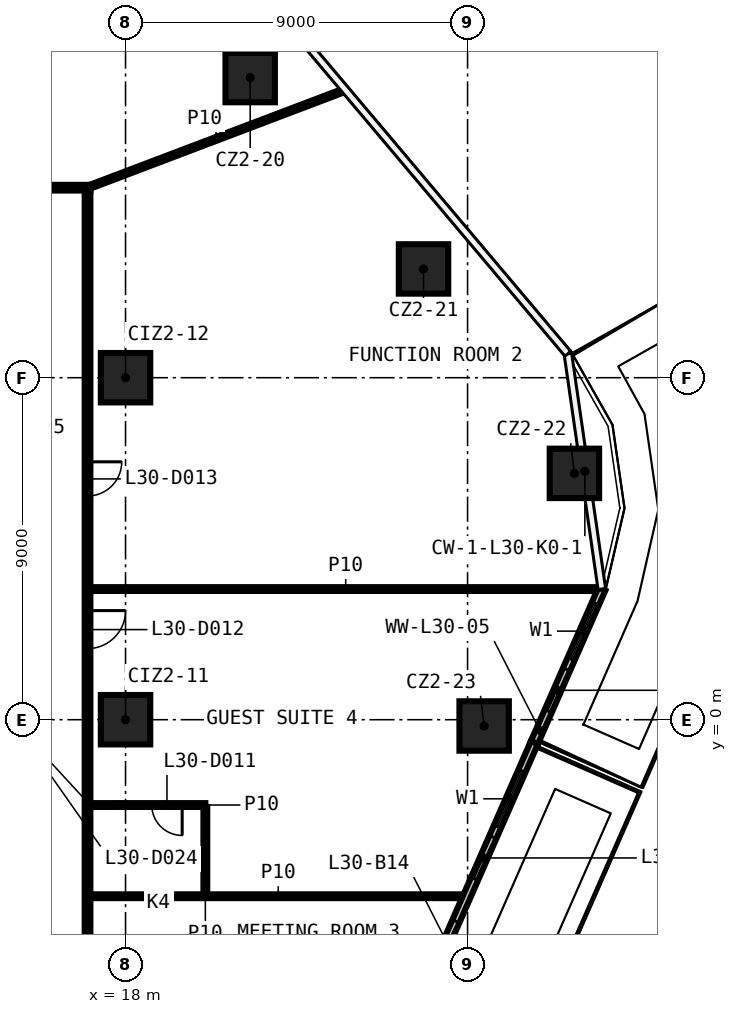
"""IFC4 building model, lengths in metres.
Left out: names, types, materials, properties, quantities, classifications, styles, units other than length and angle.
Written with IfcOpenShell. Run it as: python <this file> out.ifc"""

import sys

from ifc_helpers import new_model, si_unit, direction, frame, frame_2d, origin, origin_2d, place, context, subcontext, project, spatial, rectangle, extrude, element, fill, save


model = new_model("IFC4")
c1 = context("Model", 3, precision=1e-05, world=origin(), true_north=direction((0.0, 1.0)))
c2 = subcontext(c1, "Body", "Model", "MODEL_VIEW")
j1 = project(units=[si_unit("LENGTHUNIT", "METRE"), si_unit("PLANEANGLEUNIT", "RADIAN")], contexts=[c1])
p1 = place(None, origin())
s1 = spatial("IfcSite", under=j1, at=p1, CompositionType="ELEMENT")
p2 = place(p1, origin())
s2 = spatial("IfcBuilding", under=s1, at=p2, CompositionType="ELEMENT")
p3 = place(p2, frame((0.0, 0.0, 135.9)))
s3 = spatial("IfcBuildingStorey", under=s2, at=p3, CompositionType="ELEMENT", Elevation=135.9)
for number, where, z_axis, x_axis in (
    (1, (21.28, 16.898, 0.0), (0.0, 0.0, 1.0), (1.0, 0.0, 0.0)),
    (2, (25.841, 11.862, 0.0), (0.0, 0.0, 1.0), (1.0, 0.0, 0.0)),
    (3, (29.811, 6.482, 0.0), (0.0, 0.0, 1.0), (1.0, 0.0, 0.0)),
    (4, (27.436, -0.165, 0.0), (0.0, 0.0, 1.0), (1.0, 0.0, 0.0)),
    (5, (18.0, 0.0, 0.0), (0.0, 0.0, 1.0), (1.0, 0.0, 0.0)),
    (6, (18.0, 9.0, 0.0), (0.0, 0.0, 1.0), (1.0, 0.0, 0.0)),
):
    element("IfcColumn", number, at=place(p3, frame(where, z_axis=z_axis, x_axis=x_axis)), inside=s3, PredefinedType="COLUMN", context=c2, shape_type="SweptSolid", body=[
        extrude(rectangle(XDim=1.3, YDim=1.3, at=origin_2d()), origin(), (0.0, 0.0, 1.0), 3.3),
    ])
p4 = place(p3, frame((17.075, -4.645, 0.0), z_axis=(0.0, 0.0, 1.0), x_axis=(1.0, 0.0, 0.0)))
e7 = element("IfcWall", 7, at=p4, inside=s3, PredefinedType="PARTITIONING", context=c2, shape_type="SweptSolid", body=[
    extrude(rectangle(XDim=9.885, YDim=0.1, at=frame_2d((4.943, 0.0))), origin(), (0.0, 0.0, 1.0), 3.3),
])
p5 = place(p3, frame((20.1, -2.245, 0.0), z_axis=(0.0, 0.0, 1.0), x_axis=(-1.0, 0.0, 0.0)))
e8 = element("IfcWall", 8, at=p5, inside=s3, PredefinedType="PARTITIONING", context=c2, shape_type="SweptSolid", body=[
    extrude(rectangle(XDim=3.025, YDim=0.1, at=frame_2d((1.513, 0.0))), origin(), (0.0, 0.0, 1.0), 3.3),
])
p6 = place(p5, frame((0.61, 0.0, 0.0)))
e9 = element("IfcOpeningElement", 9, at=p6, cuts=e8, PredefinedType="OPENING", context=c2, shape_type="SweptSolid", body=[
    extrude(rectangle(XDim=0.8, YDim=2.1, at=frame_2d((0.4, 1.05))), frame((0.0, 0.06, 0.0), z_axis=(0.0, -1.0, 0.0), x_axis=(1.0, 0.0, 0.0)), (0.0, 0.0, 1.0), 0.12),
])
p7 = place(p3, frame((17.075, 3.438, 0.0), z_axis=(0.0, 0.0, 1.0), x_axis=(1.0, 0.0, 0.0)))
e10 = element("IfcWall", 10, at=p7, inside=s3, PredefinedType="PARTITIONING", context=c2, shape_type="SweptSolid", body=[
    extrude(rectangle(XDim=13.436, YDim=0.1, at=frame_2d((6.718, 0.0))), origin(), (0.0, 0.0, 1.0), 3.3),
])
p8 = place(p3, frame((-17.075, 14.0, 0.0), z_axis=(0.0, 0.0, 1.0), x_axis=(1.0, 0.0, 0.0)))
e11 = element("IfcWall", 11, at=p8, inside=s3, PredefinedType="PARTITIONING", context=c2, shape_type="SweptSolid", body=[
    extrude(rectangle(XDim=34.15, YDim=0.15, at=frame_2d((17.075, 0.0))), origin(), (0.0, 0.0, 1.0), 3.3),
])
p9 = place(p8, frame((10.954, 0.0, 0.0)))
e12 = element("IfcOpeningElement", 12, at=p9, cuts=e11, PredefinedType="OPENING", context=c2, shape_type="SweptSolid", body=[
    extrude(rectangle(XDim=0.9, YDim=2.1, at=frame_2d((0.45, 1.05))), frame((0.0, 0.085, 0.0), z_axis=(0.0, -1.0, 0.0), x_axis=(1.0, 0.0, 0.0)), (0.0, 0.0, 1.0), 0.17),
])
p10 = place(p8, frame((7.617, 0.0, 0.0)))
e13 = element("IfcOpeningElement", 13, at=p10, cuts=e11, PredefinedType="OPENING", context=c2, shape_type="SweptSolid", body=[
    extrude(rectangle(XDim=1.0, YDim=2.1, at=frame_2d((0.5, 1.05))), frame((0.0, 0.085, 0.0), z_axis=(0.0, -1.0, 0.0), x_axis=(1.0, 0.0, 0.0)), (0.0, 0.0, 1.0), 0.17),
])
p11 = place(p8, frame((2.425, 0.0, 0.0)))
e14 = element("IfcOpeningElement", 14, at=p11, cuts=e11, PredefinedType="OPENING", context=c2, shape_type="SweptSolid", body=[
    extrude(rectangle(XDim=0.9, YDim=2.1, at=frame_2d((0.45, 1.05))), frame((0.0, 0.085, 0.0), z_axis=(0.0, -1.0, 0.0), x_axis=(1.0, 0.0, 0.0)), (0.0, 0.0, 1.0), 0.17),
])
p12 = place(p3, frame((17.0, 14.0, 0.0), z_axis=(0.0, 0.0, 1.0), x_axis=(0.934953139897, 0.354771230791, 0.0)))
e15 = element("IfcWall", 15, at=p12, inside=s3, PredefinedType="PARTITIONING", context=c2, shape_type="SweptSolid", body=[
    extrude(rectangle(XDim=7.234, YDim=0.1, at=frame_2d((3.617, 0.0))), origin(), (0.0, 0.0, 1.0), 3.3),
])
p13 = place(p3, frame((20.1, -4.595, 0.0), z_axis=(0.0, 0.0, 1.0), x_axis=(0.0, 1.0, 0.0)))
e16 = element("IfcWall", 16, at=p13, inside=s3, PredefinedType="PARTITIONING", context=c2, shape_type="SweptSolid", body=[
    extrude(rectangle(XDim=2.3, YDim=0.1, at=frame_2d((1.15, 0.0))), origin(), (0.0, 0.0, 1.0), 3.3),
])
p14 = place(p3, frame((17.0, 13.925, 0.0), z_axis=(0.0, 0.0, 1.0), x_axis=(0.0, -1.0, 0.0)))
e17 = element("IfcWall", 17, at=p14, inside=s3, PredefinedType="PARTITIONING", context=c2, shape_type="SweptSolid", body=[
    extrude(rectangle(XDim=27.85, YDim=0.15, at=frame_2d((13.925, 0.0))), origin(), (0.0, 0.0, 1.0), 3.3),
])
p15 = place(p14, frame((24.983, 0.0, 0.0)))
e18 = element("IfcOpeningElement", 18, at=p15, cuts=e17, PredefinedType="OPENING", context=c2, shape_type="SweptSolid", body=[
    extrude(rectangle(XDim=0.9, YDim=2.1, at=frame_2d((0.45, 1.05))), frame((0.0, 0.085, 0.0), z_axis=(0.0, -1.0, 0.0), x_axis=(1.0, 0.0, 0.0)), (0.0, 0.0, 1.0), 0.17),
])
p16 = place(p14, frame((20.143, 0.0, 0.0)))
e19 = element("IfcOpeningElement", 19, at=p16, cuts=e17, PredefinedType="OPENING", context=c2, shape_type="SweptSolid", body=[
    extrude(rectangle(XDim=0.9, YDim=2.1, at=frame_2d((0.45, 1.05))), frame((0.0, 0.085, 0.0), z_axis=(0.0, -1.0, 0.0), x_axis=(1.0, 0.0, 0.0)), (0.0, 0.0, 1.0), 0.17),
])
p17 = place(p14, frame((11.054, 0.0, 0.0)))
e20 = element("IfcOpeningElement", 20, at=p17, cuts=e17, PredefinedType="OPENING", context=c2, shape_type="SweptSolid", body=[
    extrude(rectangle(XDim=1.0, YDim=2.1, at=frame_2d((0.5, 1.05))), frame((0.0, 0.085, 0.0), z_axis=(0.0, -1.0, 0.0), x_axis=(1.0, 0.0, 0.0)), (0.0, 0.0, 1.0), 0.17),
])
p18 = place(p14, frame((7.139, 0.0, 0.0)))
e21 = element("IfcOpeningElement", 21, at=p18, cuts=e17, PredefinedType="OPENING", context=c2, shape_type="SweptSolid", body=[
    extrude(rectangle(XDim=0.9, YDim=2.1, at=frame_2d((0.45, 1.05))), frame((0.0, 0.085, 0.0), z_axis=(0.0, -1.0, 0.0), x_axis=(1.0, 0.0, 0.0)), (0.0, 0.0, 1.0), 0.17),
])
p19 = place(p3, frame((21.65, -16.783, 0.0), z_axis=(0.0, 0.0, 1.0), x_axis=(0.402171088909, 0.915564533633, 0.0)))
e22 = element("IfcWall", 22, at=p19, inside=s3, PredefinedType="SOLIDWALL", context=c2, shape_type="SweptSolid", body=[
    extrude(rectangle(XDim=17.677, YDim=0.2, at=frame_2d((8.838, 0.0))), origin(), (0.0, 0.0, 1.0), 3.3),
])
p20 = place(p19, frame((2.0, 0.0, 0.6)))
e23 = element("IfcOpeningElement", 23, at=p20, cuts=e22, PredefinedType="OPENING", context=c2, shape_type="SweptSolid", body=[
    extrude(rectangle(XDim=1.6, YDim=2.4, at=frame_2d((0.8, 1.2))), frame((0.0, 0.11, 0.0), z_axis=(0.0, -1.0, 0.0), x_axis=(1.0, 0.0, 0.0)), (0.0, 0.0, 1.0), 0.22),
])
p21 = place(p19, frame((0.5, 0.0, 0.0)))
e24 = element("IfcOpeningElement", 24, at=p21, cuts=e22, PredefinedType="OPENING", context=c2, shape_type="SweptSolid", body=[
    extrude(rectangle(XDim=1.2, YDim=2.4, at=frame_2d((0.6, 1.2))), frame((0.0, 0.11, 0.0), z_axis=(0.0, -1.0, 0.0), x_axis=(1.0, 0.0, 0.0)), (0.0, 0.0, 1.0), 0.22),
])
p22 = place(p19, frame((6.419, 0.0, 0.6)))
e25 = element("IfcOpeningElement", 25, at=p22, cuts=e22, PredefinedType="OPENING", context=c2, shape_type="SweptSolid", body=[
    extrude(rectangle(XDim=1.6, YDim=2.4, at=frame_2d((0.8, 1.2))), frame((0.0, 0.11, 0.0), z_axis=(0.0, -1.0, 0.0), x_axis=(1.0, 0.0, 0.0)), (0.0, 0.0, 1.0), 0.22),
])
p23 = place(p19, frame((4.919, 0.0, 0.0)))
e26 = element("IfcOpeningElement", 26, at=p23, cuts=e22, PredefinedType="OPENING", context=c2, shape_type="SweptSolid", body=[
    extrude(rectangle(XDim=1.2, YDim=2.4, at=frame_2d((0.6, 1.2))), frame((0.0, 0.11, 0.0), z_axis=(0.0, -1.0, 0.0), x_axis=(1.0, 0.0, 0.0)), (0.0, 0.0, 1.0), 0.22),
])
p24 = place(p19, frame((9.338, 0.0, 0.6)))
e27 = element("IfcOpeningElement", 27, at=p24, cuts=e22, PredefinedType="OPENING", context=c2, shape_type="SweptSolid", body=[
    extrude(rectangle(XDim=1.6, YDim=2.4, at=frame_2d((0.8, 1.2))), frame((0.0, 0.11, 0.0), z_axis=(0.0, -1.0, 0.0), x_axis=(1.0, 0.0, 0.0)), (0.0, 0.0, 1.0), 0.22),
])
p25 = place(p19, frame((11.338, 0.0, 0.0)))
e28 = element("IfcOpeningElement", 28, at=p25, cuts=e22, PredefinedType="OPENING", context=c2, shape_type="SweptSolid", body=[
    extrude(rectangle(XDim=1.2, YDim=2.4, at=frame_2d((0.6, 1.2))), frame((0.0, 0.11, 0.0), z_axis=(0.0, -1.0, 0.0), x_axis=(1.0, 0.0, 0.0)), (0.0, 0.0, 1.0), 0.22),
])
p26 = place(p19, frame((15.258, 0.0, 0.6)))
e29 = element("IfcOpeningElement", 29, at=p26, cuts=e22, PredefinedType="OPENING", context=c2, shape_type="SweptSolid", body=[
    extrude(rectangle(XDim=1.6, YDim=2.4, at=frame_2d((0.8, 1.2))), frame((0.0, 0.11, 0.0), z_axis=(0.0, -1.0, 0.0), x_axis=(1.0, 0.0, 0.0)), (0.0, 0.0, 1.0), 0.22),
])
p27 = place(p19, frame((13.758, 0.0, 0.0)))
e30 = element("IfcOpeningElement", 30, at=p27, cuts=e22, PredefinedType="OPENING", context=c2, shape_type="SweptSolid", body=[
    extrude(rectangle(XDim=1.2, YDim=2.4, at=frame_2d((0.6, 1.2))), frame((0.0, 0.11, 0.0), z_axis=(0.0, -1.0, 0.0), x_axis=(1.0, 0.0, 0.0)), (0.0, 0.0, 1.0), 0.22),
])
p28 = place(p3, frame((28.76, -0.599, 0.0), z_axis=(0.0, 0.0, 1.0), x_axis=(0.402194955318, 0.915554049697, 0.0)))
e31 = element("IfcWall", 31, at=p28, inside=s3, PredefinedType="SOLIDWALL", context=c2, shape_type="SweptSolid", body=[
    extrude(rectangle(XDim=4.41, YDim=0.2, at=frame_2d((2.205, 0.0))), origin(), (0.0, 0.0, 1.0), 3.3),
])
p29 = place(p28, frame((2.4, 0.0, 0.6)))
e32 = element("IfcOpeningElement", 32, at=p29, cuts=e31, PredefinedType="OPENING", context=c2, shape_type="SweptSolid", body=[
    extrude(rectangle(XDim=1.6, YDim=2.4, at=frame_2d((0.8, 1.2))), frame((0.0, 0.11, 0.0), z_axis=(0.0, -1.0, 0.0), x_axis=(1.0, 0.0, 0.0)), (0.0, 0.0, 1.0), 0.22),
])
p30 = place(p28, frame((0.9, 0.0, 0.0)))
e33 = element("IfcOpeningElement", 33, at=p30, cuts=e31, PredefinedType="OPENING", context=c2, shape_type="SweptSolid", body=[
    extrude(rectangle(XDim=1.2, YDim=2.4, at=frame_2d((0.6, 1.2))), frame((0.0, 0.11, 0.0), z_axis=(0.0, -1.0, 0.0), x_axis=(1.0, 0.0, 0.0)), (0.0, 0.0, 1.0), 0.22),
])
p31 = place(p6, origin())
e34 = element("IfcDoor", 34, at=p31, inside=s3, OperationType="SINGLE_SWING_LEFT", PredefinedType="DOOR", context=c2, shape_type="SweptSolid", body=[
    extrude(rectangle(XDim=0.8, YDim=2.1, at=frame_2d((0.4, 1.05))), frame((0.0, 0.025, 0.0), z_axis=(0.0, -1.0, 0.0), x_axis=(1.0, 0.0, 0.0)), (0.0, 0.0, 1.0), 0.05),
])
fill(e9, e34)
p32 = place(p17, origin())
e35 = element("IfcDoor", 35, at=p32, inside=s3, OperationType="SINGLE_SWING_RIGHT", PredefinedType="DOOR", context=c2, shape_type="SweptSolid", body=[
    extrude(rectangle(XDim=1.0, YDim=2.1, at=frame_2d((0.5, 1.05))), frame((0.0, 0.025, 0.0), z_axis=(0.0, -1.0, 0.0), x_axis=(1.0, 0.0, 0.0)), (0.0, 0.0, 1.0), 0.05),
])
fill(e20, e35)
p33 = place(p18, origin())
e36 = element("IfcDoor", 36, at=p33, inside=s3, OperationType="SINGLE_SWING_LEFT", PredefinedType="DOOR", context=c2, shape_type="SweptSolid", body=[
    extrude(rectangle(XDim=0.9, YDim=2.1, at=frame_2d((0.45, 1.05))), frame((0.0, 0.025, 0.0), z_axis=(0.0, -1.0, 0.0), x_axis=(1.0, 0.0, 0.0)), (0.0, 0.0, 1.0), 0.05),
])
fill(e21, e36)
p34 = place(p25, origin())
e37 = element("IfcDoor", 37, at=p34, inside=s3, OperationType="SLIDING_TO_LEFT", PredefinedType="DOOR", context=c2, shape_type="SweptSolid", body=[
    extrude(rectangle(XDim=1.2, YDim=2.4, at=frame_2d((0.6, 1.2))), frame((0.0, 0.025, 0.0), z_axis=(0.0, -1.0, 0.0), x_axis=(1.0, 0.0, 0.0)), (0.0, 0.0, 1.0), 0.05),
])
fill(e28, e37)
p35 = place(p26, origin())
e38 = element("IfcWindow", 38, at=p35, inside=s3, PartitioningType="SINGLE_PANEL", PredefinedType="WINDOW", context=c2, shape_type="SweptSolid", body=[
    extrude(rectangle(XDim=1.6, YDim=2.4, at=frame_2d((0.8, 1.2))), frame((0.0, 0.03, 0.0), z_axis=(0.0, -1.0, 0.0), x_axis=(1.0, 0.0, 0.0)), (0.0, 0.0, 1.0), 0.06),
])
fill(e29, e38)
p36 = place(p27, origin())
e39 = element("IfcDoor", 39, at=p36, inside=s3, OperationType="SLIDING_TO_LEFT", PredefinedType="DOOR", context=c2, shape_type="SweptSolid", body=[
    extrude(rectangle(XDim=1.2, YDim=2.4, at=frame_2d((0.6, 1.2))), frame((0.0, 0.025, 0.0), z_axis=(0.0, -1.0, 0.0), x_axis=(1.0, 0.0, 0.0)), (0.0, 0.0, 1.0), 0.05),
])
fill(e30, e39)
p37 = place(p29, origin())
e40 = element("IfcWindow", 40, at=p37, inside=s3, PartitioningType="SINGLE_PANEL", PredefinedType="WINDOW", context=c2, shape_type="SweptSolid", body=[
    extrude(rectangle(XDim=1.6, YDim=2.4, at=frame_2d((0.8, 1.2))), frame((0.0, 0.03, 0.0), z_axis=(0.0, -1.0, 0.0), x_axis=(1.0, 0.0, 0.0)), (0.0, 0.0, 1.0), 0.06),
])
fill(e32, e40)
p38 = place(p30, origin())
e41 = element("IfcDoor", 41, at=p38, inside=s3, OperationType="SLIDING_TO_LEFT", PredefinedType="DOOR", context=c2, shape_type="SweptSolid", body=[
    extrude(rectangle(XDim=1.2, YDim=2.4, at=frame_2d((0.6, 1.2))), frame((0.0, 0.025, 0.0), z_axis=(0.0, -1.0, 0.0), x_axis=(1.0, 0.0, 0.0)), (0.0, 0.0, 1.0), 0.05),
])
fill(e33, e41)
save(model, sys.argv[1])
